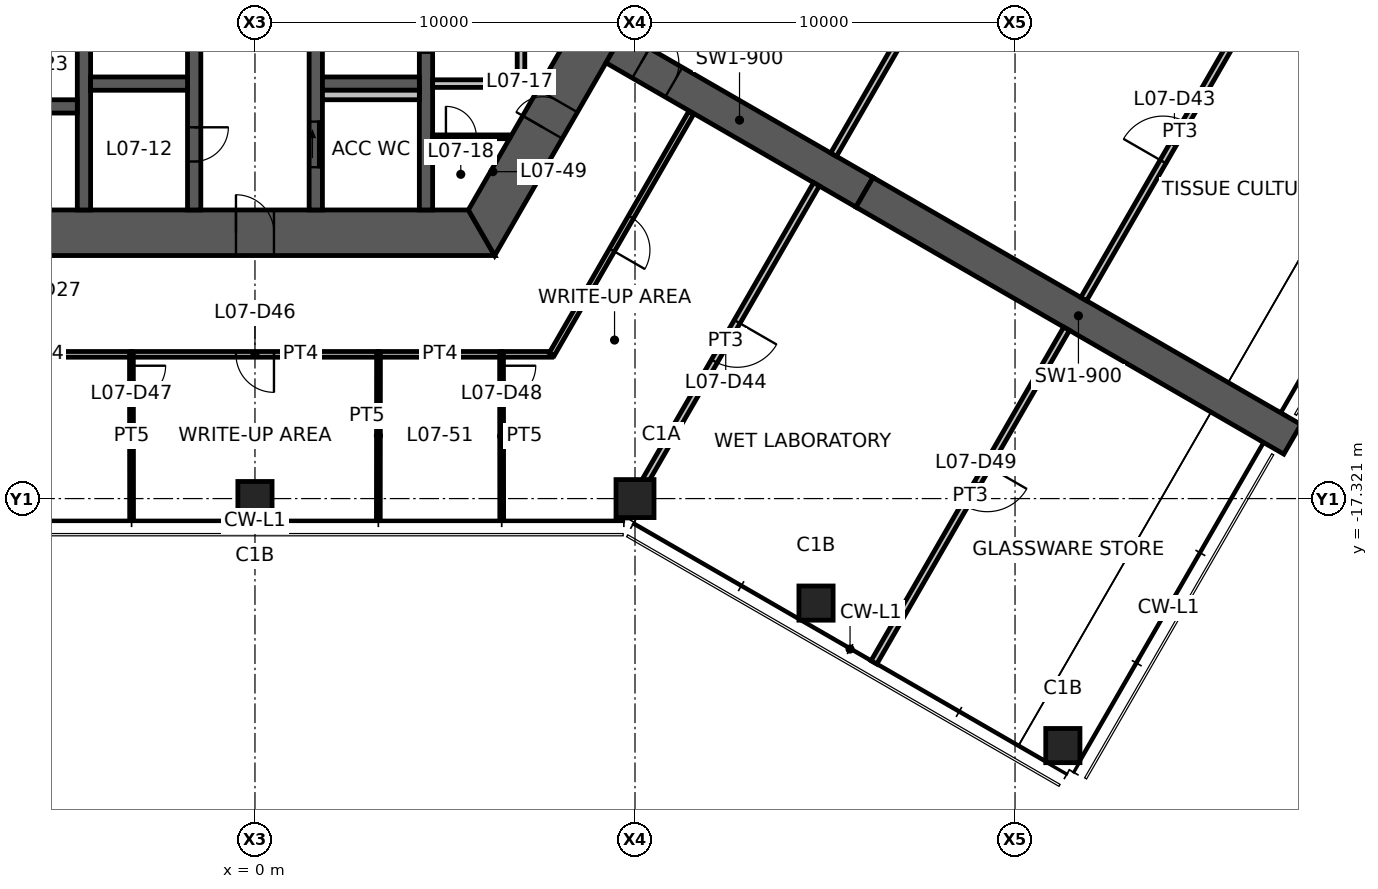
"""IFC4 building model, lengths in metres.
Left out: names, types, materials, properties, quantities, classifications, styles, units other than length and angle.
Written with IfcOpenShell. Run it as: python <this file> out.ifc"""

import sys

from ifc_helpers import new_model, si_unit, direction, frame, frame_2d, origin, origin_2d, place, context, subcontext, project, spatial, polyline, rectangle, hollow_rectangle, outline, extrude, element, fill, save


model = new_model("IFC4")
c1 = context("Model", 3, precision=1e-05, world=origin(), true_north=direction((0.0, 1.0)))
c2 = subcontext(c1, "Body", "Model", "MODEL_VIEW")
j1 = project(units=[si_unit("LENGTHUNIT", "METRE"), si_unit("PLANEANGLEUNIT", "RADIAN")], contexts=[c1])
p1 = place(None, origin())
s1 = spatial("IfcSite", under=j1, at=p1, CompositionType="ELEMENT")
p2 = place(p1, origin())
s2 = spatial("IfcBuilding", under=s1, at=p2, CompositionType="ELEMENT")
p3 = place(p2, frame((0.0, 0.0, 26.8)))
s3 = spatial("IfcBuildingStorey", under=s2, at=p3, CompositionType="ELEMENT", Elevation=26.8)
p4 = place(p3, frame((10.0, -17.321, 0.0), z_axis=(0.0, 0.0, 1.0), x_axis=(1.0, 0.0, 0.0)))
e1 = element("IfcColumn", 1, at=p4, inside=s3, PredefinedType="COLUMN", context=c2, shape_type="SweptSolid", body=[
    extrude(hollow_rectangle(XDim=1.0, YDim=1.0, WallThickness=0.06, at=origin_2d()), origin(), (0.0, 0.0, 1.0), 4.2),
])
for number, where, z_axis, x_axis in (
    (2, (0.0, -17.321, 0.0), (0.0, 0.0, 1.0), (1.0, 0.0, 0.0)),
    (3, (14.763, -20.071, 0.0), (0.0, 0.0, 1.0), (1.0, 0.0, 0.0)),
    (4, (21.258, -23.821, 0.0), (0.0, 0.0, 1.0), (1.0, 0.0, 0.0)),
):
    element("IfcColumn", number, at=place(p3, frame(where, z_axis=z_axis, x_axis=x_axis)), inside=s3, PredefinedType="COLUMN", context=c2, shape_type="SweptSolid", body=[
        extrude(hollow_rectangle(XDim=0.9, YDim=0.9, WallThickness=0.05, at=origin_2d()), origin(), (0.0, 0.0, 1.0), 4.2),
    ])
p5 = place(p3, frame((-5.961, -10.325, 0.0), z_axis=(0.0, 0.0, 1.0), x_axis=(1.0, 0.0, 0.0)))
e5 = element("IfcWall", 5, at=p5, inside=s3, PredefinedType="SHEAR", context=c2, shape_type="SweptSolid", body=[
    extrude(outline(polyline([(-0.346, -0.6), (5.461, -0.6), (6.461, -0.6), (12.269, -0.6), (11.576, 0.6), (6.461, 0.6), (5.461, 0.6), (0.346, 0.6), (-0.346, -0.6)])), origin(), (0.0, 0.0, 1.0), 4.2),
])
p6 = place(p5, frame((5.461, 0.0, 0.0)))
e6 = element("IfcOpeningElement", 6, at=p6, cuts=e5, PredefinedType="OPENING", context=c2, shape_type="SweptSolid", body=[
    extrude(rectangle(XDim=1.0, YDim=2.1, at=frame_2d((0.5, 1.05))), frame((0.0, 0.61, 0.0), z_axis=(0.0, -1.0, 0.0), x_axis=(1.0, 0.0, 0.0)), (0.0, 0.0, 1.0), 1.22),
])
p7 = place(p3, frame((5.961, -10.325, 0.0), z_axis=(0.0, 0.0, 1.0), x_axis=(0.500004296715, 0.866022923061, 0.0)))
e7 = element("IfcWall", 7, at=p7, inside=s3, PredefinedType="SHEAR", context=c2, shape_type="SweptSolid", body=[
    extrude(outline(polyline([(-0.346, -0.6), (3.208, -0.6), (4.009, -0.6), (12.269, -0.6), (11.576, 0.6), (4.009, 0.6), (3.208, 0.6), (0.346, 0.6), (-0.346, -0.6)])), origin(), (0.0, 0.0, 1.0), 4.2),
])
p8 = place(p7, frame((3.208, 0.0, 0.0)))
e8 = element("IfcOpeningElement", 8, at=p8, cuts=e7, PredefinedType="OPENING", context=c2, shape_type="SweptSolid", body=[
    extrude(rectangle(XDim=0.8, YDim=2.1, at=frame_2d((0.4, 1.05))), frame((0.0, 0.61, 0.0), z_axis=(0.0, -1.0, 0.0), x_axis=(1.0, 0.0, 0.0)), (0.0, 0.0, 1.0), 1.22),
])
p9 = place(p3, frame((9.461, -5.462, 0.0), z_axis=(0.0, 0.0, 1.0), x_axis=(0.866019116917, -0.500010889016, 0.0)))
e9 = element("IfcWall", 9, at=p9, inside=s3, PredefinedType="SHEAR", context=c2, shape_type="SweptSolid", body=[
    extrude(rectangle(XDim=7.595, YDim=0.9, at=frame_2d((3.798, 0.0))), origin(), (0.0, 0.0, 1.0), 4.2),
])
p10 = place(p9, frame((0.8, 0.0, 0.0)))
e10 = element("IfcOpeningElement", 10, at=p10, cuts=e9, PredefinedType="OPENING", context=c2, shape_type="SweptSolid", body=[
    extrude(rectangle(XDim=1.0, YDim=2.1, at=frame_2d((0.5, 1.05))), frame((0.0, 0.46, 0.0), z_axis=(0.0, -1.0, 0.0), x_axis=(1.0, 0.0, 0.0)), (0.0, 0.0, 1.0), 0.92),
])
p11 = place(p3, frame((16.039, -9.26, 0.0), z_axis=(0.0, 0.0, 1.0), x_axis=(0.866024837091, -0.50000098154, 0.0)))
e11 = element("IfcWall", 11, at=p11, inside=s3, PredefinedType="SHEAR", context=c2, shape_type="SweptSolid", body=[
    extrude(rectangle(XDim=13.0, YDim=0.9, at=frame_2d((6.5, 0.0))), origin(), (0.0, 0.0, 1.0), 4.2),
])
p12 = place(p3, frame((-1.6, -3.775, 0.0), z_axis=(0.0, 0.0, 1.0), x_axis=(0.0, -1.0, 0.0)))
e12 = element("IfcWall", 12, at=p12, inside=s3, PredefinedType="SHEAR", context=c2, shape_type="SweptSolid", body=[
    extrude(rectangle(XDim=5.95, YDim=0.35, at=frame_2d((2.975, 0.0))), origin(), (0.0, 0.0, 1.0), 4.2),
])
p13 = place(p12, frame((3.775, 0.0, 0.0)))
e13 = element("IfcOpeningElement", 13, at=p13, cuts=e12, PredefinedType="OPENING", context=c2, shape_type="SweptSolid", body=[
    extrude(rectangle(XDim=0.9, YDim=2.1, at=frame_2d((0.45, 1.05))), frame((0.0, 0.185, 0.0), z_axis=(0.0, -1.0, 0.0), x_axis=(1.0, 0.0, 0.0)), (0.0, 0.0, 1.0), 0.37),
])
p14 = place(p3, frame((1.6, -3.775, 0.0), z_axis=(0.0, 0.0, 1.0), x_axis=(0.0, -1.0, 0.0)))
e14 = element("IfcWall", 14, at=p14, inside=s3, PredefinedType="SHEAR", context=c2, shape_type="SweptSolid", body=[
    extrude(rectangle(XDim=5.95, YDim=0.35, at=frame_2d((2.975, 0.0))), origin(), (0.0, 0.0, 1.0), 4.2),
])
p15 = place(p14, frame((3.625, 0.0, 0.0)))
e15 = element("IfcOpeningElement", 15, at=p15, cuts=e14, PredefinedType="OPENING", context=c2, shape_type="SweptSolid", body=[
    extrude(rectangle(XDim=1.2, YDim=2.1, at=frame_2d((0.6, 1.05))), frame((0.0, 0.185, 0.0), z_axis=(0.0, -1.0, 0.0), x_axis=(1.0, 0.0, 0.0)), (0.0, 0.0, 1.0), 0.37),
])
p16 = place(p3, frame((-4.5, -3.775, 0.0), z_axis=(0.0, 0.0, 1.0), x_axis=(0.0, -1.0, 0.0)))
e16 = element("IfcWall", 16, at=p16, inside=s3, PredefinedType="SHEAR", context=c2, shape_type="SweptSolid", body=[
    extrude(rectangle(XDim=5.95, YDim=0.35, at=frame_2d((2.975, 0.0))), origin(), (0.0, 0.0, 1.0), 4.2),
])
p17 = place(p3, frame((4.5, -3.775, 0.0), z_axis=(0.0, 0.0, 1.0), x_axis=(0.0, -1.0, 0.0)))
e17 = element("IfcWall", 17, at=p17, inside=s3, PredefinedType="SHEAR", context=c2, shape_type="SweptSolid", body=[
    extrude(rectangle(XDim=5.95, YDim=0.35, at=frame_2d((2.975, 0.0))), origin(), (0.0, 0.0, 1.0), 4.2),
])
p18 = place(p17, frame((0.712, 0.0, 0.0)))
e18 = element("IfcOpeningElement", 18, at=p18, cuts=e17, PredefinedType="OPENING", context=c2, shape_type="SweptSolid", body=[
    extrude(rectangle(XDim=1.1, YDim=2.1, at=frame_2d((0.55, 1.05))), frame((0.0, 0.185, 0.0), z_axis=(0.0, -1.0, 0.0), x_axis=(1.0, 0.0, 0.0)), (0.0, 0.0, 1.0), 0.37),
])
for number, where, z_axis, x_axis in (
    (19, (-4.325, -6.4, 0.0), (0.0, 0.0, 1.0), (1.0, 0.0, 0.0)),
    (20, (1.775, -6.4, 0.0), (0.0, 0.0, 1.0), (1.0, 0.0, 0.0)),
):
    element("IfcWall", number, at=place(p3, frame(where, z_axis=z_axis, x_axis=x_axis)), inside=s3, PredefinedType="SHEAR", context=c2, shape_type="SweptSolid", body=[
        extrude(rectangle(XDim=2.55, YDim=0.35, at=frame_2d((1.275, 0.0))), origin(), (0.0, 0.0, 1.0), 4.2),
    ])
p19 = place(p3, frame((-6.925, -7.0, 0.0), z_axis=(0.0, 0.0, 1.0), x_axis=(1.0, 0.0, 0.0)))
e21 = element("IfcWall", 21, at=p19, inside=s3, PredefinedType="SHEAR", context=c2, shape_type="SweptSolid", body=[
    extrude(rectangle(XDim=2.25, YDim=0.35, at=frame_2d((1.125, 0.0))), origin(), (0.0, 0.0, 1.0), 4.2),
])
p20 = place(p3, frame((4.675, -6.4, 0.0), z_axis=(0.0, 0.0, 1.0), x_axis=(1.0, 0.0, 0.0)))
e22 = element("IfcWall", 22, at=p20, inside=s3, PredefinedType="STANDARD", context=c2, shape_type="SweptSolid", body=[
    extrude(rectangle(XDim=2.425, YDim=0.2, at=frame_2d((1.212, 0.0))), origin(), (0.0, 0.0, 1.0), 4.2),
])
p21 = place(p3, frame((7.0, -3.775, 0.0), z_axis=(0.0, 0.0, 1.0), x_axis=(0.0, -1.0, 0.0)))
e23 = element("IfcWall", 23, at=p21, inside=s3, PredefinedType="STANDARD", context=c2, shape_type="SweptSolid", body=[
    extrude(rectangle(XDim=2.525, YDim=0.2, at=frame_2d((1.263, 0.0))), origin(), (0.0, 0.0, 1.0), 4.2),
])
p22 = place(p3, frame((1.775, -6.7, 0.0), z_axis=(0.0, 0.0, 1.0), x_axis=(1.0, 0.0, 0.0)))
e24 = element("IfcWall", 24, at=p22, inside=s3, PredefinedType="PLUMBINGWALL", context=c2, shape_type="SweptSolid", body=[
    extrude(rectangle(XDim=2.55, YDim=0.25, at=frame_2d((1.275, 0.0))), origin(), (0.0, 0.0, 1.0), 4.2),
])
p23 = place(p3, frame((4.675, -7.8, 0.0), z_axis=(0.0, 0.0, 1.0), x_axis=(1.0, 0.0, 0.0)))
e25 = element("IfcWall", 25, at=p23, inside=s3, PredefinedType="PARTITIONING", context=c2, shape_type="SweptSolid", body=[
    extrude(outline(polyline([(0.0, -0.05), (0.35, -0.05), (1.15, -0.05), (2.022, -0.05), (2.051, 0.0), (2.057, 0.05), (1.15, 0.05), (0.35, 0.05), (0.0, 0.05), (0.0, -0.05)])), origin(), (0.0, 0.0, 1.0), 3.23),
])
p24 = place(p23, frame((0.35, 0.0, 0.0)))
e26 = element("IfcOpeningElement", 26, at=p24, cuts=e25, PredefinedType="OPENING", context=c2, shape_type="SweptSolid", body=[
    extrude(rectangle(XDim=0.8, YDim=2.1, at=frame_2d((0.4, 1.05))), frame((0.0, 0.06, 0.0), z_axis=(0.0, -1.0, 0.0), x_axis=(1.0, 0.0, 0.0)), (0.0, 0.0, 1.0), 0.12),
])
p25 = place(p3, frame((15.225, -8.271, 0.0), z_axis=(0.0, 0.0, 1.0), x_axis=(0.499993908199, 0.866028920859, 0.0)))
e27 = element("IfcWall", 27, at=p25, inside=s3, PredefinedType="PARTITIONING", context=c2, shape_type="SweptSolid", body=[
    extrude(rectangle(XDim=9.55, YDim=0.175, at=frame_2d((4.775, 0.0))), origin(), (0.0, 0.0, 1.0), 3.238),
])
p26 = place(p25, frame((4.175, 0.0, 0.0)))
e28 = element("IfcOpeningElement", 28, at=p26, cuts=e27, PredefinedType="OPENING", context=c2, shape_type="SweptSolid", body=[
    extrude(rectangle(XDim=1.2, YDim=2.1, at=frame_2d((0.6, 1.05))), frame((0.0, 0.098, 0.0), z_axis=(0.0, -1.0, 0.0), x_axis=(1.0, 0.0, 0.0)), (0.0, 0.0, 1.0), 0.195),
])
p27 = place(p3, frame((21.807, -12.071, 0.0), z_axis=(0.0, 0.0, 1.0), x_axis=(0.499994227129, 0.866028736727, 0.0)))
e29 = element("IfcWall", 29, at=p27, inside=s3, PredefinedType="PARTITIONING", context=c2, shape_type="SweptSolid", body=[
    extrude(rectangle(XDim=10.135, YDim=0.175, at=frame_2d((5.067, 0.0))), origin(), (0.0, 0.0, 1.0), 4.03),
])
p28 = place(p27, frame((4.175, 0.0, 0.0)))
e30 = element("IfcOpeningElement", 30, at=p28, cuts=e29, PredefinedType="OPENING", context=c2, shape_type="SweptSolid", body=[
    extrude(rectangle(XDim=1.2, YDim=2.1, at=frame_2d((0.6, 1.05))), frame((0.0, 0.098, 0.0), z_axis=(0.0, -1.0, 0.0), x_axis=(1.0, 0.0, 0.0)), (0.0, 0.0, 1.0), 0.195),
])
p29 = place(p3, frame((14.775, -9.05, 0.0), z_axis=(0.0, 0.0, 1.0), x_axis=(-0.499993908199, -0.866028920859, 0.0)))
e31 = element("IfcWall", 31, at=p29, inside=s3, PredefinedType="PARTITIONING", context=c2, shape_type="SweptSolid", body=[
    extrude(rectangle(XDim=9.55, YDim=0.175, at=frame_2d((4.775, 0.0))), origin(), (0.0, 0.0, 1.0), 3.238),
])
p30 = place(p29, frame((4.175, 0.0, 0.0)))
e32 = element("IfcOpeningElement", 32, at=p30, cuts=e31, PredefinedType="OPENING", context=c2, shape_type="SweptSolid", body=[
    extrude(rectangle(XDim=1.2, YDim=2.1, at=frame_2d((0.6, 1.05))), frame((0.0, 0.098, 0.0), z_axis=(0.0, -1.0, 0.0), x_axis=(1.0, 0.0, 0.0)), (0.0, 0.0, 1.0), 0.195),
])
p31 = place(p3, frame((-3.241, -13.525, 0.0), z_axis=(0.0, 0.0, 1.0), x_axis=(-1.0, 0.0, 0.0)))
e33 = element("IfcWall", 33, at=p31, inside=s3, PredefinedType="PARTITIONING", context=c2, shape_type="SweptSolid", body=[
    extrude(rectangle(XDim=4.544, YDim=0.15, at=frame_2d((2.272, 0.0))), origin(), (0.0, 0.0, 1.0), 3.23),
])
p32 = place(p3, frame((6.498, -13.525, 0.0), z_axis=(0.0, 0.0, 1.0), x_axis=(-1.0, 0.0, 0.0)))
e34 = element("IfcWall", 34, at=p32, inside=s3, PredefinedType="PARTITIONING", context=c2, shape_type="SweptSolid", body=[
    extrude(rectangle(XDim=3.256, YDim=0.15, at=frame_2d((1.628, 0.0))), origin(), (0.0, 0.0, 1.0), 3.23),
])
p33 = place(p3, frame((7.809, -13.525, 0.0), z_axis=(0.0, 0.0, 1.0), x_axis=(-1.0, 0.0, 0.0)))
e35 = element("IfcWall", 35, at=p33, inside=s3, PredefinedType="PARTITIONING", context=c2, shape_type="SweptSolid", body=[
    extrude(rectangle(XDim=1.32, YDim=0.15, at=frame_2d((0.66, 0.0))), origin(), (0.0, 0.0, 1.0), 3.23),
])
p34 = place(p3, frame((11.478, -7.169, 0.0), z_axis=(0.0, 0.0, 1.0), x_axis=(-0.500010424145, -0.866019385318, 0.0)))
e36 = element("IfcWall", 36, at=p34, inside=s3, PredefinedType="PARTITIONING", context=c2, shape_type="SweptSolid", body=[
    extrude(rectangle(XDim=7.339, YDim=0.15, at=frame_2d((3.669, 0.0))), origin(), (0.0, 0.0, 1.0), 3.23),
])
p35 = place(p34, frame((3.169, 0.0, 0.0)))
e37 = element("IfcOpeningElement", 37, at=p35, cuts=e36, PredefinedType="OPENING", context=c2, shape_type="SweptSolid", body=[
    extrude(rectangle(XDim=1.0, YDim=2.1, at=frame_2d((0.5, 1.05))), frame((0.0, 0.085, 0.0), z_axis=(0.0, -1.0, 0.0), x_axis=(1.0, 0.0, 0.0)), (0.0, 0.0, 1.0), 0.17),
])
p36 = place(p3, frame((3.251, -13.525, 0.0), z_axis=(0.0, 0.0, 1.0), x_axis=(-1.0, 0.0, 0.0)))
e38 = element("IfcWall", 38, at=p36, inside=s3, PredefinedType="PARTITIONING", context=c2, shape_type="SweptSolid", body=[
    extrude(rectangle(XDim=6.502, YDim=0.15, at=frame_2d((3.251, 0.0))), origin(), (0.0, 0.0, 1.0), 3.23),
])
p37 = place(p36, frame((2.751, 0.0, 0.0)))
e39 = element("IfcOpeningElement", 39, at=p37, cuts=e38, PredefinedType="OPENING", context=c2, shape_type="SweptSolid", body=[
    extrude(rectangle(XDim=1.0, YDim=2.1, at=frame_2d((0.5, 1.05))), frame((0.0, 0.085, 0.0), z_axis=(0.0, -1.0, 0.0), x_axis=(1.0, 0.0, 0.0)), (0.0, 0.0, 1.0), 0.17),
])
p38 = place(p3, frame((-3.251, -13.525, 0.0), z_axis=(0.0, 0.0, 1.0), x_axis=(0.001076120809, -0.999999420982, 0.0)))
e40 = element("IfcWall", 40, at=p38, inside=s3, PredefinedType="PARTITIONING", context=c2, shape_type="SweptSolid", body=[
    extrude(rectangle(XDim=4.311, YDim=0.1, at=frame_2d((2.155, 0.0))), origin(), (0.0, 0.0, 1.0), 3.23),
])
p39 = place(p38, frame((0.3, 0.0, 0.0)))
e41 = element("IfcOpeningElement", 41, at=p39, cuts=e40, PredefinedType="OPENING", context=c2, shape_type="SweptSolid", body=[
    extrude(rectangle(XDim=0.9, YDim=2.1, at=frame_2d((0.45, 1.05))), frame((0.0, 0.06, 0.0), z_axis=(0.0, -1.0, 0.0), x_axis=(1.0, 0.0, 0.0)), (0.0, 0.0, 1.0), 0.12),
])
p40 = place(p3, frame((6.488, -13.525, 0.0), z_axis=(0.0, 0.0, 1.0), x_axis=(0.001076120809, -0.999999420982, 0.0)))
e42 = element("IfcWall", 42, at=p40, inside=s3, PredefinedType="PARTITIONING", context=c2, shape_type="SweptSolid", body=[
    extrude(rectangle(XDim=4.311, YDim=0.1, at=frame_2d((2.155, 0.0))), origin(), (0.0, 0.0, 1.0), 3.23),
])
p41 = place(p40, frame((0.3, 0.0, 0.0)))
e43 = element("IfcOpeningElement", 43, at=p41, cuts=e42, PredefinedType="OPENING", context=c2, shape_type="SweptSolid", body=[
    extrude(rectangle(XDim=0.9, YDim=2.1, at=frame_2d((0.45, 1.05))), frame((0.0, 0.06, 0.0), z_axis=(0.0, -1.0, 0.0), x_axis=(1.0, 0.0, 0.0)), (0.0, 0.0, 1.0), 0.12),
])
p42 = place(p3, frame((3.246, -17.801, 0.0), z_axis=(0.0, 0.0, 1.0), x_axis=(0.001084907715, 0.999999411487, 0.0)))
e44 = element("IfcWall", 44, at=p42, inside=s3, PredefinedType="PARTITIONING", context=c2, shape_type="SweptSolid", body=[
    extrude(rectangle(XDim=4.276, YDim=0.1, at=frame_2d((2.138, 0.0))), origin(), (0.0, 0.0, 1.0), 3.23),
])
p43 = place(p3, frame((21.357, -12.85, 0.0), z_axis=(0.0, 0.0, 1.0), x_axis=(-0.499987145745, -0.866032825065, 0.0)))
e45 = element("IfcWall", 45, at=p43, inside=s3, PredefinedType="PARTITIONING", context=c2, shape_type="SweptSolid", body=[
    extrude(rectangle(XDim=10.14, YDim=0.175, at=frame_2d((5.07, 0.0))), origin(), (0.0, 0.0, 1.0), 4.03),
])
p44 = place(p43, frame((4.175, 0.0, 0.0)))
e46 = element("IfcOpeningElement", 46, at=p44, cuts=e45, PredefinedType="OPENING", context=c2, shape_type="SweptSolid", body=[
    extrude(rectangle(XDim=1.2, YDim=2.1, at=frame_2d((0.6, 1.05))), frame((0.0, 0.098, 0.0), z_axis=(0.0, -1.0, 0.0), x_axis=(1.0, 0.0, 0.0)), (0.0, 0.0, 1.0), 0.195),
])
p45 = place(p6, origin())
e47 = element("IfcDoor", 47, at=p45, inside=s3, OperationType="SINGLE_SWING_LEFT", PredefinedType="DOOR", context=c2, shape_type="SweptSolid", body=[
    extrude(rectangle(XDim=1.0, YDim=2.1, at=frame_2d((0.5, 1.05))), frame((0.0, 0.025, 0.0), z_axis=(0.0, -1.0, 0.0), x_axis=(1.0, 0.0, 0.0)), (0.0, 0.0, 1.0), 0.05),
])
fill(e6, e47)
p46 = place(p8, origin())
e48 = element("IfcDoor", 48, at=p46, inside=s3, OperationType="SINGLE_SWING_LEFT", PredefinedType="DOOR", context=c2, shape_type="SweptSolid", body=[
    extrude(rectangle(XDim=0.8, YDim=2.1, at=frame_2d((0.4, 1.05))), frame((0.0, 0.025, 0.0), z_axis=(0.0, -1.0, 0.0), x_axis=(1.0, 0.0, 0.0)), (0.0, 0.0, 1.0), 0.05),
])
fill(e8, e48)
p47 = place(p15, origin())
e49 = element("IfcDoor", 49, at=p47, inside=s3, OperationType="SLIDING_TO_LEFT", PredefinedType="DOOR", context=c2, shape_type="SweptSolid", body=[
    extrude(rectangle(XDim=1.2, YDim=2.1, at=frame_2d((0.6, 1.05))), frame((0.0, 0.025, 0.0), z_axis=(0.0, -1.0, 0.0), x_axis=(1.0, 0.0, 0.0)), (0.0, 0.0, 1.0), 0.05),
])
fill(e15, e49)
p48 = place(p13, origin())
e50 = element("IfcDoor", 50, at=p48, inside=s3, OperationType="SINGLE_SWING_LEFT", PredefinedType="DOOR", context=c2, shape_type="SweptSolid", body=[
    extrude(rectangle(XDim=0.9, YDim=2.1, at=frame_2d((0.45, 1.05))), frame((0.0, 0.025, 0.0), z_axis=(0.0, -1.0, 0.0), x_axis=(1.0, 0.0, 0.0)), (0.0, 0.0, 1.0), 0.05),
])
fill(e13, e50)
p49 = place(p10, origin())
e51 = element("IfcDoor", 51, at=p49, inside=s3, OperationType="SINGLE_SWING_LEFT", PredefinedType="DOOR", context=c2, shape_type="SweptSolid", body=[
    extrude(rectangle(XDim=1.0, YDim=2.1, at=frame_2d((0.5, 1.05))), frame((0.0, 0.025, 0.0), z_axis=(0.0, -1.0, 0.0), x_axis=(1.0, 0.0, 0.0)), (0.0, 0.0, 1.0), 0.05),
])
fill(e10, e51)
p50 = place(p24, origin())
e52 = element("IfcDoor", 52, at=p50, inside=s3, OperationType="SINGLE_SWING_LEFT", PredefinedType="DOOR", context=c2, shape_type="SweptSolid", body=[
    extrude(rectangle(XDim=0.8, YDim=2.1, at=frame_2d((0.4, 1.05))), frame((0.0, 0.025, 0.0), z_axis=(0.0, -1.0, 0.0), x_axis=(1.0, 0.0, 0.0)), (0.0, 0.0, 1.0), 0.05),
])
fill(e26, e52)
p51 = place(p28, origin())
e53 = element("IfcDoor", 53, at=p51, inside=s3, OperationType="DOUBLE_DOOR_SINGLE_SWING", PredefinedType="DOOR", context=c2, shape_type="SweptSolid", body=[
    extrude(rectangle(XDim=1.2, YDim=2.1, at=frame_2d((0.6, 1.05))), frame((0.0, 0.025, 0.0), z_axis=(0.0, -1.0, 0.0), x_axis=(1.0, 0.0, 0.0)), (0.0, 0.0, 1.0), 0.05),
])
fill(e30, e53)
p52 = place(p30, origin())
e54 = element("IfcDoor", 54, at=p52, inside=s3, OperationType="DOUBLE_DOOR_SINGLE_SWING", PredefinedType="DOOR", context=c2, shape_type="SweptSolid", body=[
    extrude(rectangle(XDim=1.2, YDim=2.1, at=frame_2d((0.6, 1.05))), frame((0.0, 0.025, 0.0), z_axis=(0.0, -1.0, 0.0), x_axis=(1.0, 0.0, 0.0)), (0.0, 0.0, 1.0), 0.05),
])
fill(e32, e54)
p53 = place(p35, origin())
e55 = element("IfcDoor", 55, at=p53, inside=s3, OperationType="SINGLE_SWING_RIGHT", PredefinedType="DOOR", context=c2, shape_type="SweptSolid", body=[
    extrude(rectangle(XDim=1.0, YDim=2.1, at=frame_2d((0.5, 1.05))), frame((0.0, 0.025, 0.0), z_axis=(0.0, -1.0, 0.0), x_axis=(1.0, 0.0, 0.0)), (0.0, 0.0, 1.0), 0.05),
])
fill(e37, e55)
p54 = place(p37, origin())
e56 = element("IfcDoor", 56, at=p54, inside=s3, OperationType="SINGLE_SWING_LEFT", PredefinedType="DOOR", context=c2, shape_type="SweptSolid", body=[
    extrude(rectangle(XDim=1.0, YDim=2.1, at=frame_2d((0.5, 1.05))), frame((0.0, 0.025, 0.0), z_axis=(0.0, -1.0, 0.0), x_axis=(1.0, 0.0, 0.0)), (0.0, 0.0, 1.0), 0.05),
])
fill(e39, e56)
p55 = place(p39, origin())
e57 = element("IfcDoor", 57, at=p55, inside=s3, OperationType="SINGLE_SWING_LEFT", PredefinedType="DOOR", context=c2, shape_type="SweptSolid", body=[
    extrude(rectangle(XDim=0.9, YDim=2.1, at=frame_2d((0.45, 1.05))), frame((0.0, 0.025, 0.0), z_axis=(0.0, -1.0, 0.0), x_axis=(1.0, 0.0, 0.0)), (0.0, 0.0, 1.0), 0.05),
])
fill(e41, e57)
p56 = place(p41, origin())
e58 = element("IfcDoor", 58, at=p56, inside=s3, OperationType="SINGLE_SWING_LEFT", PredefinedType="DOOR", context=c2, shape_type="SweptSolid", body=[
    extrude(rectangle(XDim=0.9, YDim=2.1, at=frame_2d((0.45, 1.05))), frame((0.0, 0.025, 0.0), z_axis=(0.0, -1.0, 0.0), x_axis=(1.0, 0.0, 0.0)), (0.0, 0.0, 1.0), 0.05),
])
fill(e43, e58)
p57 = place(p44, origin())
e59 = element("IfcDoor", 59, at=p57, inside=s3, OperationType="DOUBLE_DOOR_SINGLE_SWING", PredefinedType="DOOR", context=c2, shape_type="SweptSolid", body=[
    extrude(rectangle(XDim=1.2, YDim=2.1, at=frame_2d((0.6, 1.05))), frame((0.0, 0.025, 0.0), z_axis=(0.0, -1.0, 0.0), x_axis=(1.0, 0.0, 0.0)), (0.0, 0.0, 1.0), 0.05),
])
fill(e46, e59)
p58 = place(p18, origin())
e60 = element("IfcDoor", 60, at=p58, inside=s3, OperationType="DOUBLE_DOOR_SLIDING", PredefinedType="DOOR", context=c2, shape_type="SweptSolid", body=[
    extrude(rectangle(XDim=1.1, YDim=2.1, at=frame_2d((0.55, 1.05))), frame((0.0, 0.025, 0.0), z_axis=(0.0, -1.0, 0.0), x_axis=(1.0, 0.0, 0.0)), (0.0, 0.0, 1.0), 0.05),
])
fill(e18, e60)
save(model, sys.argv[1])
